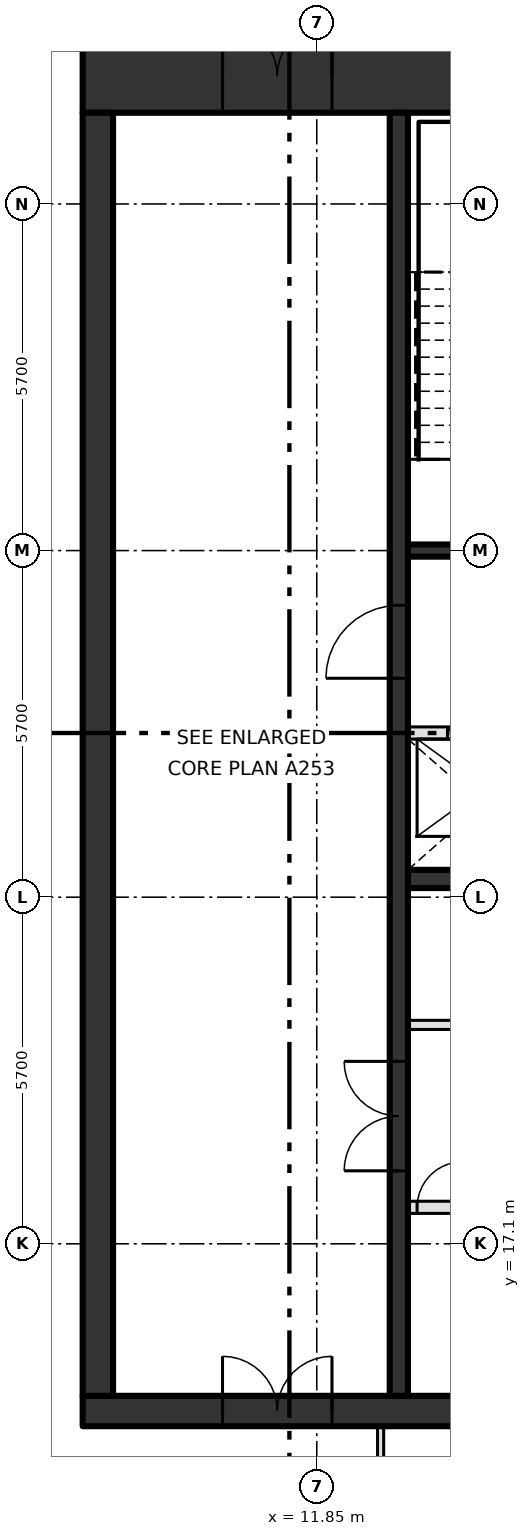
"""IFC4 building model, lengths in metres.
Left out: names, types, materials, properties, quantities, classifications, styles, units other than length and angle.
Written with IfcOpenShell. Run it as: python <this file> out.ifc"""

import sys

from ifc_helpers import new_model, si_unit, direction, frame, frame_2d, origin, place, context, subcontext, project, spatial, rectangle, extrude, element, fill, save


model = new_model("IFC4")
c1 = context("Model", 3, precision=1e-05, world=origin(), true_north=direction((0.0, 1.0)))
c2 = subcontext(c1, "Body", "Model", "MODEL_VIEW")
j1 = project(units=[si_unit("LENGTHUNIT", "METRE"), si_unit("PLANEANGLEUNIT", "RADIAN")], contexts=[c1])
p1 = place(None, origin())
s1 = spatial("IfcSite", under=j1, at=p1, CompositionType="ELEMENT")
p2 = place(p1, origin())
s2 = spatial("IfcBuilding", under=s1, at=p2, CompositionType="ELEMENT")
p3 = place(p2, frame((0.0, 0.0, 396.0)))
s3 = spatial("IfcBuildingStorey", under=s2, at=p3, CompositionType="ELEMENT", Elevation=396.0)
p4 = place(p3, frame((8.0, 14.35, -0.3), z_axis=(0.0, 0.0, 1.0), x_axis=(1.0, 0.0, 0.0)))
e1 = element("IfcWall", 1, at=p4, inside=s3, PredefinedType="SHEAR", context=c2, shape_type="SweptSolid", body=[
    extrude(rectangle(XDim=22.8, YDim=0.5, at=frame_2d((11.4, 0.0))), origin(), (0.0, 0.0, 1.0), 4.05),
])
p5 = place(p4, frame((2.3, 0.0, 0.3)))
e2 = element("IfcOpeningElement", 2, at=p5, cuts=e1, PredefinedType="OPENING", context=c2, shape_type="SweptSolid", body=[
    extrude(rectangle(XDim=1.8, YDim=2.1, at=frame_2d((0.9, 1.05))), frame((0.0, 0.26, 0.0), z_axis=(0.0, -1.0, 0.0), x_axis=(1.0, 0.0, 0.0)), (0.0, 0.0, 1.0), 0.52),
])
p6 = place(p3, frame((8.0, 36.3, -0.3), z_axis=(0.0, 0.0, 1.0), x_axis=(1.0, 0.0, 0.0)))
e3 = element("IfcWall", 3, at=p6, inside=s3, PredefinedType="SHEAR", context=c2, shape_type="SweptSolid", body=[
    extrude(rectangle(XDim=22.8, YDim=1.2, at=frame_2d((11.4, 0.0))), origin(), (0.0, 0.0, 1.0), 4.05),
])
p7 = place(p6, frame((2.3, 0.0, 0.3)))
e4 = element("IfcOpeningElement", 4, at=p7, cuts=e3, PredefinedType="OPENING", context=c2, shape_type="SweptSolid", body=[
    extrude(rectangle(XDim=1.8, YDim=2.1, at=frame_2d((0.9, 1.05))), frame((0.0, 0.61, 0.0), z_axis=(0.0, -1.0, 0.0), x_axis=(1.0, 0.0, 0.0)), (0.0, 0.0, 1.0), 1.22),
])
p8 = place(p3, frame((8.25, 14.6, -0.3), z_axis=(0.0, 0.0, 1.0), x_axis=(0.0, 1.0, 0.0)))
e5 = element("IfcWall", 5, at=p8, inside=s3, PredefinedType="SHEAR", context=c2, shape_type="SweptSolid", body=[
    extrude(rectangle(XDim=21.1, YDim=0.5, at=frame_2d((10.55, 0.0))), origin(), (0.0, 0.0, 1.0), 4.05),
])
p9 = place(p3, frame((13.35, 17.7, 0.0), z_axis=(0.0, 0.0, 1.0), x_axis=(1.0, 0.0, 0.0)))
e6 = element("IfcWall", 6, at=p9, inside=s3, PredefinedType="SOLIDWALL", context=c2, shape_type="SweptSolid", body=[
    extrude(rectangle(XDim=13.425, YDim=0.2, at=frame_2d((6.712, 0.0))), origin(), (0.0, 0.0, 1.0), 3.75),
])
p10 = place(p9, frame((2.0, 0.0, 0.0)))
e7 = element("IfcOpeningElement", 7, at=p10, cuts=e6, PredefinedType="OPENING", context=c2, shape_type="SweptSolid", body=[
    extrude(rectangle(XDim=1.1, YDim=2.1, at=frame_2d((0.55, 1.05))), frame((0.0, 0.11, 0.0), z_axis=(0.0, -1.0, 0.0), x_axis=(1.0, 0.0, 0.0)), (0.0, 0.0, 1.0), 0.22),
])
p11 = place(p9, frame((4.7, 0.0, 0.0)))
e8 = element("IfcOpeningElement", 8, at=p11, cuts=e6, PredefinedType="OPENING", context=c2, shape_type="SweptSolid", body=[
    extrude(rectangle(XDim=1.1, YDim=2.1, at=frame_2d((0.55, 1.05))), frame((0.0, 0.11, 0.0), z_axis=(0.0, -1.0, 0.0), x_axis=(1.0, 0.0, 0.0)), (0.0, 0.0, 1.0), 0.22),
])
p12 = place(p9, frame((7.4, 0.0, 0.0)))
e9 = element("IfcOpeningElement", 9, at=p12, cuts=e6, PredefinedType="OPENING", context=c2, shape_type="SweptSolid", body=[
    extrude(rectangle(XDim=1.1, YDim=2.1, at=frame_2d((0.55, 1.05))), frame((0.0, 0.11, 0.0), z_axis=(0.0, -1.0, 0.0), x_axis=(1.0, 0.0, 0.0)), (0.0, 0.0, 1.0), 0.22),
])
p13 = place(p9, frame((10.1, 0.0, 0.0)))
e10 = element("IfcOpeningElement", 10, at=p13, cuts=e6, PredefinedType="OPENING", context=c2, shape_type="SweptSolid", body=[
    extrude(rectangle(XDim=1.1, YDim=2.1, at=frame_2d((0.55, 1.05))), frame((0.0, 0.11, 0.0), z_axis=(0.0, -1.0, 0.0), x_axis=(1.0, 0.0, 0.0)), (0.0, 0.0, 1.0), 0.22),
])
p14 = place(p9, frame((0.15, 0.0, 0.0)))
e11 = element("IfcOpeningElement", 11, at=p14, cuts=e6, PredefinedType="OPENING", context=c2, shape_type="SweptSolid", body=[
    extrude(rectangle(XDim=0.75, YDim=2.1, at=frame_2d((0.375, 1.05))), frame((0.0, 0.11, 0.0), z_axis=(0.0, -1.0, 0.0), x_axis=(1.0, 0.0, 0.0)), (0.0, 0.0, 1.0), 0.22),
])
p15 = place(p9, frame((12.3, 0.0, 0.0)))
e12 = element("IfcOpeningElement", 12, at=p15, cuts=e6, PredefinedType="OPENING", context=c2, shape_type="SweptSolid", body=[
    extrude(rectangle(XDim=0.75, YDim=2.1, at=frame_2d((0.375, 1.05))), frame((0.0, 0.11, 0.0), z_axis=(0.0, -1.0, 0.0), x_axis=(1.0, 0.0, 0.0)), (0.0, 0.0, 1.0), 0.22),
])
p16 = place(p3, frame((13.35, 20.7, 0.0), z_axis=(0.0, 0.0, 1.0), x_axis=(1.0, 0.0, 0.0)))
e13 = element("IfcWall", 13, at=p16, inside=s3, PredefinedType="PARTITIONING", context=c2, shape_type="SweptSolid", body=[
    extrude(rectangle(XDim=13.425, YDim=0.15, at=frame_2d((6.712, 0.0))), origin(), (0.0, 0.0, 1.0), 3.75),
])
p17 = place(p16, frame((0.75, 0.0, 0.0)))
e14 = element("IfcOpeningElement", 14, at=p17, cuts=e13, PredefinedType="OPENING", context=c2, shape_type="SweptSolid", body=[
    extrude(rectangle(XDim=0.9, YDim=2.1, at=frame_2d((0.45, 1.05))), frame((0.0, 0.085, 0.0), z_axis=(0.0, -1.0, 0.0), x_axis=(1.0, 0.0, 0.0)), (0.0, 0.0, 1.0), 0.17),
])
p18 = place(p16, frame((7.5, 0.0, 0.0)))
e15 = element("IfcOpeningElement", 15, at=p18, cuts=e13, PredefinedType="OPENING", context=c2, shape_type="SweptSolid", body=[
    extrude(rectangle(XDim=0.9, YDim=2.1, at=frame_2d((0.45, 1.05))), frame((0.0, 0.085, 0.0), z_axis=(0.0, -1.0, 0.0), x_axis=(1.0, 0.0, 0.0)), (0.0, 0.0, 1.0), 0.17),
])
p19 = place(p3, frame((13.35, 23.1, 0.0), z_axis=(0.0, 0.0, 1.0), x_axis=(1.0, 0.0, 0.0)))
e16 = element("IfcWall", 16, at=p19, inside=s3, PredefinedType="SHEAR", context=c2, shape_type="SweptSolid", body=[
    extrude(rectangle(XDim=16.95, YDim=0.3, at=frame_2d((8.475, 0.0))), origin(), (0.0, 0.0, 1.0), 3.75),
])
p20 = place(p3, frame((13.35, 25.5, 0.0), z_axis=(0.0, 0.0, 1.0), x_axis=(1.0, 0.0, 0.0)))
e17 = element("IfcWall", 17, at=p20, inside=s3, PredefinedType="SOLIDWALL", context=c2, shape_type="SweptSolid", body=[
    extrude(rectangle(XDim=16.95, YDim=0.2, at=frame_2d((8.475, 0.0))), origin(), (0.0, 0.0, 1.0), 3.75),
])
p21 = place(p20, frame((0.65, 0.0, 0.0)))
e18 = element("IfcOpeningElement", 18, at=p21, cuts=e17, PredefinedType="OPENING", context=c2, shape_type="SweptSolid", body=[
    extrude(rectangle(XDim=1.1, YDim=2.1, at=frame_2d((0.55, 1.05))), frame((0.0, 0.11, 0.0), z_axis=(0.0, -1.0, 0.0), x_axis=(1.0, 0.0, 0.0)), (0.0, 0.0, 1.0), 0.22),
])
p22 = place(p20, frame((3.35, 0.0, 0.0)))
e19 = element("IfcOpeningElement", 19, at=p22, cuts=e17, PredefinedType="OPENING", context=c2, shape_type="SweptSolid", body=[
    extrude(rectangle(XDim=1.1, YDim=2.1, at=frame_2d((0.55, 1.05))), frame((0.0, 0.11, 0.0), z_axis=(0.0, -1.0, 0.0), x_axis=(1.0, 0.0, 0.0)), (0.0, 0.0, 1.0), 0.22),
])
p23 = place(p20, frame((6.05, 0.0, 0.0)))
e20 = element("IfcOpeningElement", 20, at=p23, cuts=e17, PredefinedType="OPENING", context=c2, shape_type="SweptSolid", body=[
    extrude(rectangle(XDim=1.1, YDim=2.1, at=frame_2d((0.55, 1.05))), frame((0.0, 0.11, 0.0), z_axis=(0.0, -1.0, 0.0), x_axis=(1.0, 0.0, 0.0)), (0.0, 0.0, 1.0), 0.22),
])
p24 = place(p20, frame((8.75, 0.0, 0.0)))
e21 = element("IfcOpeningElement", 21, at=p24, cuts=e17, PredefinedType="OPENING", context=c2, shape_type="SweptSolid", body=[
    extrude(rectangle(XDim=1.1, YDim=2.1, at=frame_2d((0.55, 1.05))), frame((0.0, 0.11, 0.0), z_axis=(0.0, -1.0, 0.0), x_axis=(1.0, 0.0, 0.0)), (0.0, 0.0, 1.0), 0.22),
])
p25 = place(p20, frame((13.0, 0.0, 0.0)))
e22 = element("IfcOpeningElement", 22, at=p25, cuts=e17, PredefinedType="OPENING", context=c2, shape_type="SweptSolid", body=[
    extrude(rectangle(XDim=0.9, YDim=2.1, at=frame_2d((0.45, 1.05))), frame((0.0, 0.11, 0.0), z_axis=(0.0, -1.0, 0.0), x_axis=(1.0, 0.0, 0.0)), (0.0, 0.0, 1.0), 0.22),
])
p26 = place(p3, frame((13.35, 28.5, 0.0), z_axis=(0.0, 0.0, 1.0), x_axis=(1.0, 0.0, 0.0)))
e23 = element("IfcWall", 23, at=p26, inside=s3, PredefinedType="SOLIDWALL", context=c2, shape_type="SweptSolid", body=[
    extrude(rectangle(XDim=6.75, YDim=0.2, at=frame_2d((3.375, 0.0))), origin(), (0.0, 0.0, 1.0), 3.75),
])
p27 = place(p26, frame((0.95, 0.0, 0.0)))
e24 = element("IfcOpeningElement", 24, at=p27, cuts=e23, PredefinedType="OPENING", context=c2, shape_type="SweptSolid", body=[
    extrude(rectangle(XDim=1.2, YDim=2.1, at=frame_2d((0.6, 1.05))), frame((0.0, 0.11, 0.0), z_axis=(0.0, -1.0, 0.0), x_axis=(1.0, 0.0, 0.0)), (0.0, 0.0, 1.0), 0.22),
])
p28 = place(p26, frame((3.75, 0.0, 0.0)))
e25 = element("IfcOpeningElement", 25, at=p28, cuts=e23, PredefinedType="OPENING", context=c2, shape_type="SweptSolid", body=[
    extrude(rectangle(XDim=1.1, YDim=2.1, at=frame_2d((0.55, 1.05))), frame((0.0, 0.11, 0.0), z_axis=(0.0, -1.0, 0.0), x_axis=(1.0, 0.0, 0.0)), (0.0, 0.0, 1.0), 0.22),
])
p29 = place(p3, frame((13.2, 14.6, 0.0), z_axis=(0.0, 0.0, 1.0), x_axis=(0.0, 1.0, 0.0)))
e26 = element("IfcWall", 26, at=p29, inside=s3, PredefinedType="SHEAR", context=c2, shape_type="SweptSolid", body=[
    extrude(rectangle(XDim=21.1, YDim=0.3, at=frame_2d((10.55, 0.0))), origin(), (0.0, 0.0, 1.0), 3.75),
])
p30 = place(p29, frame((3.7, 0.0, 0.0)))
e27 = element("IfcOpeningElement", 27, at=p30, cuts=e26, PredefinedType="OPENING", context=c2, shape_type="SweptSolid", body=[
    extrude(rectangle(XDim=1.8, YDim=2.1, at=frame_2d((0.9, 1.05))), frame((0.0, 0.16, 0.0), z_axis=(0.0, -1.0, 0.0), x_axis=(1.0, 0.0, 0.0)), (0.0, 0.0, 1.0), 0.32),
])
p31 = place(p29, frame((11.8, 0.0, 0.0)))
e28 = element("IfcOpeningElement", 28, at=p31, cuts=e26, PredefinedType="OPENING", context=c2, shape_type="SweptSolid", body=[
    extrude(rectangle(XDim=1.2, YDim=2.1, at=frame_2d((0.6, 1.05))), frame((0.0, 0.16, 0.0), z_axis=(0.0, -1.0, 0.0), x_axis=(1.0, 0.0, 0.0)), (0.0, 0.0, 1.0), 0.32),
])
p32 = place(p3, frame((12.9, 9.59, 0.0), z_axis=(0.0, 0.0, 1.0), x_axis=(0.0, 1.0, 0.0)))
e29 = element("IfcWall", 29, at=p32, inside=s3, PredefinedType="PARTITIONING", context=c2, shape_type="SweptSolid", body=[
    extrude(rectangle(XDim=4.51, YDim=0.1, at=frame_2d((2.255, 0.0))), origin(), (0.0, 0.0, 1.0), 3.75),
])
p33 = place(p21, origin())
e30 = element("IfcDoor", 30, at=p33, inside=s3, OperationType="SLIDING_TO_LEFT", PredefinedType="DOOR", context=c2, shape_type="SweptSolid", body=[
    extrude(rectangle(XDim=1.1, YDim=2.1, at=frame_2d((0.55, 1.05))), frame((0.0, 0.025, 0.0), z_axis=(0.0, -1.0, 0.0), x_axis=(1.0, 0.0, 0.0)), (0.0, 0.0, 1.0), 0.05),
])
fill(e18, e30)
p34 = place(p14, origin())
e31 = element("IfcDoor", 31, at=p34, inside=s3, OperationType="SINGLE_SWING_RIGHT", PredefinedType="DOOR", context=c2, shape_type="SweptSolid", body=[
    extrude(rectangle(XDim=0.75, YDim=2.1, at=frame_2d((0.375, 1.05))), frame((0.0, 0.025, 0.0), z_axis=(0.0, -1.0, 0.0), x_axis=(1.0, 0.0, 0.0)), (0.0, 0.0, 1.0), 0.05),
])
fill(e11, e31)
p35 = place(p30, origin())
e32 = element("IfcDoor", 32, at=p35, inside=s3, OperationType="DOUBLE_DOOR_SINGLE_SWING", PredefinedType="DOOR", context=c2, shape_type="SweptSolid", body=[
    extrude(rectangle(XDim=1.8, YDim=2.1, at=frame_2d((0.9, 1.05))), frame((0.0, 0.025, 0.0), z_axis=(0.0, -1.0, 0.0), x_axis=(1.0, 0.0, 0.0)), (0.0, 0.0, 1.0), 0.05),
])
fill(e27, e32)
p36 = place(p31, origin())
e33 = element("IfcDoor", 33, at=p36, inside=s3, OperationType="SINGLE_SWING_LEFT", PredefinedType="DOOR", context=c2, shape_type="SweptSolid", body=[
    extrude(rectangle(XDim=1.2, YDim=2.1, at=frame_2d((0.6, 1.05))), frame((0.0, 0.025, 0.0), z_axis=(0.0, -1.0, 0.0), x_axis=(1.0, 0.0, 0.0)), (0.0, 0.0, 1.0), 0.05),
])
fill(e28, e33)
p37 = place(p7, origin())
e34 = element("IfcDoor", 34, at=p37, inside=s3, OperationType="DOUBLE_DOOR_SINGLE_SWING", PredefinedType="DOOR", context=c2, shape_type="SweptSolid", body=[
    extrude(rectangle(XDim=1.8, YDim=2.1, at=frame_2d((0.9, 1.05))), frame((0.0, 0.025, 0.0), z_axis=(0.0, -1.0, 0.0), x_axis=(1.0, 0.0, 0.0)), (0.0, 0.0, 1.0), 0.05),
])
fill(e4, e34)
p38 = place(p5, origin())
e35 = element("IfcDoor", 35, at=p38, inside=s3, OperationType="DOUBLE_DOOR_SINGLE_SWING", PredefinedType="DOOR", context=c2, shape_type="SweptSolid", body=[
    extrude(rectangle(XDim=1.8, YDim=2.1, at=frame_2d((0.9, 1.05))), frame((0.0, 0.025, 0.0), z_axis=(0.0, -1.0, 0.0), x_axis=(1.0, 0.0, 0.0)), (0.0, 0.0, 1.0), 0.05),
])
fill(e2, e35)
save(model, sys.argv[1])
